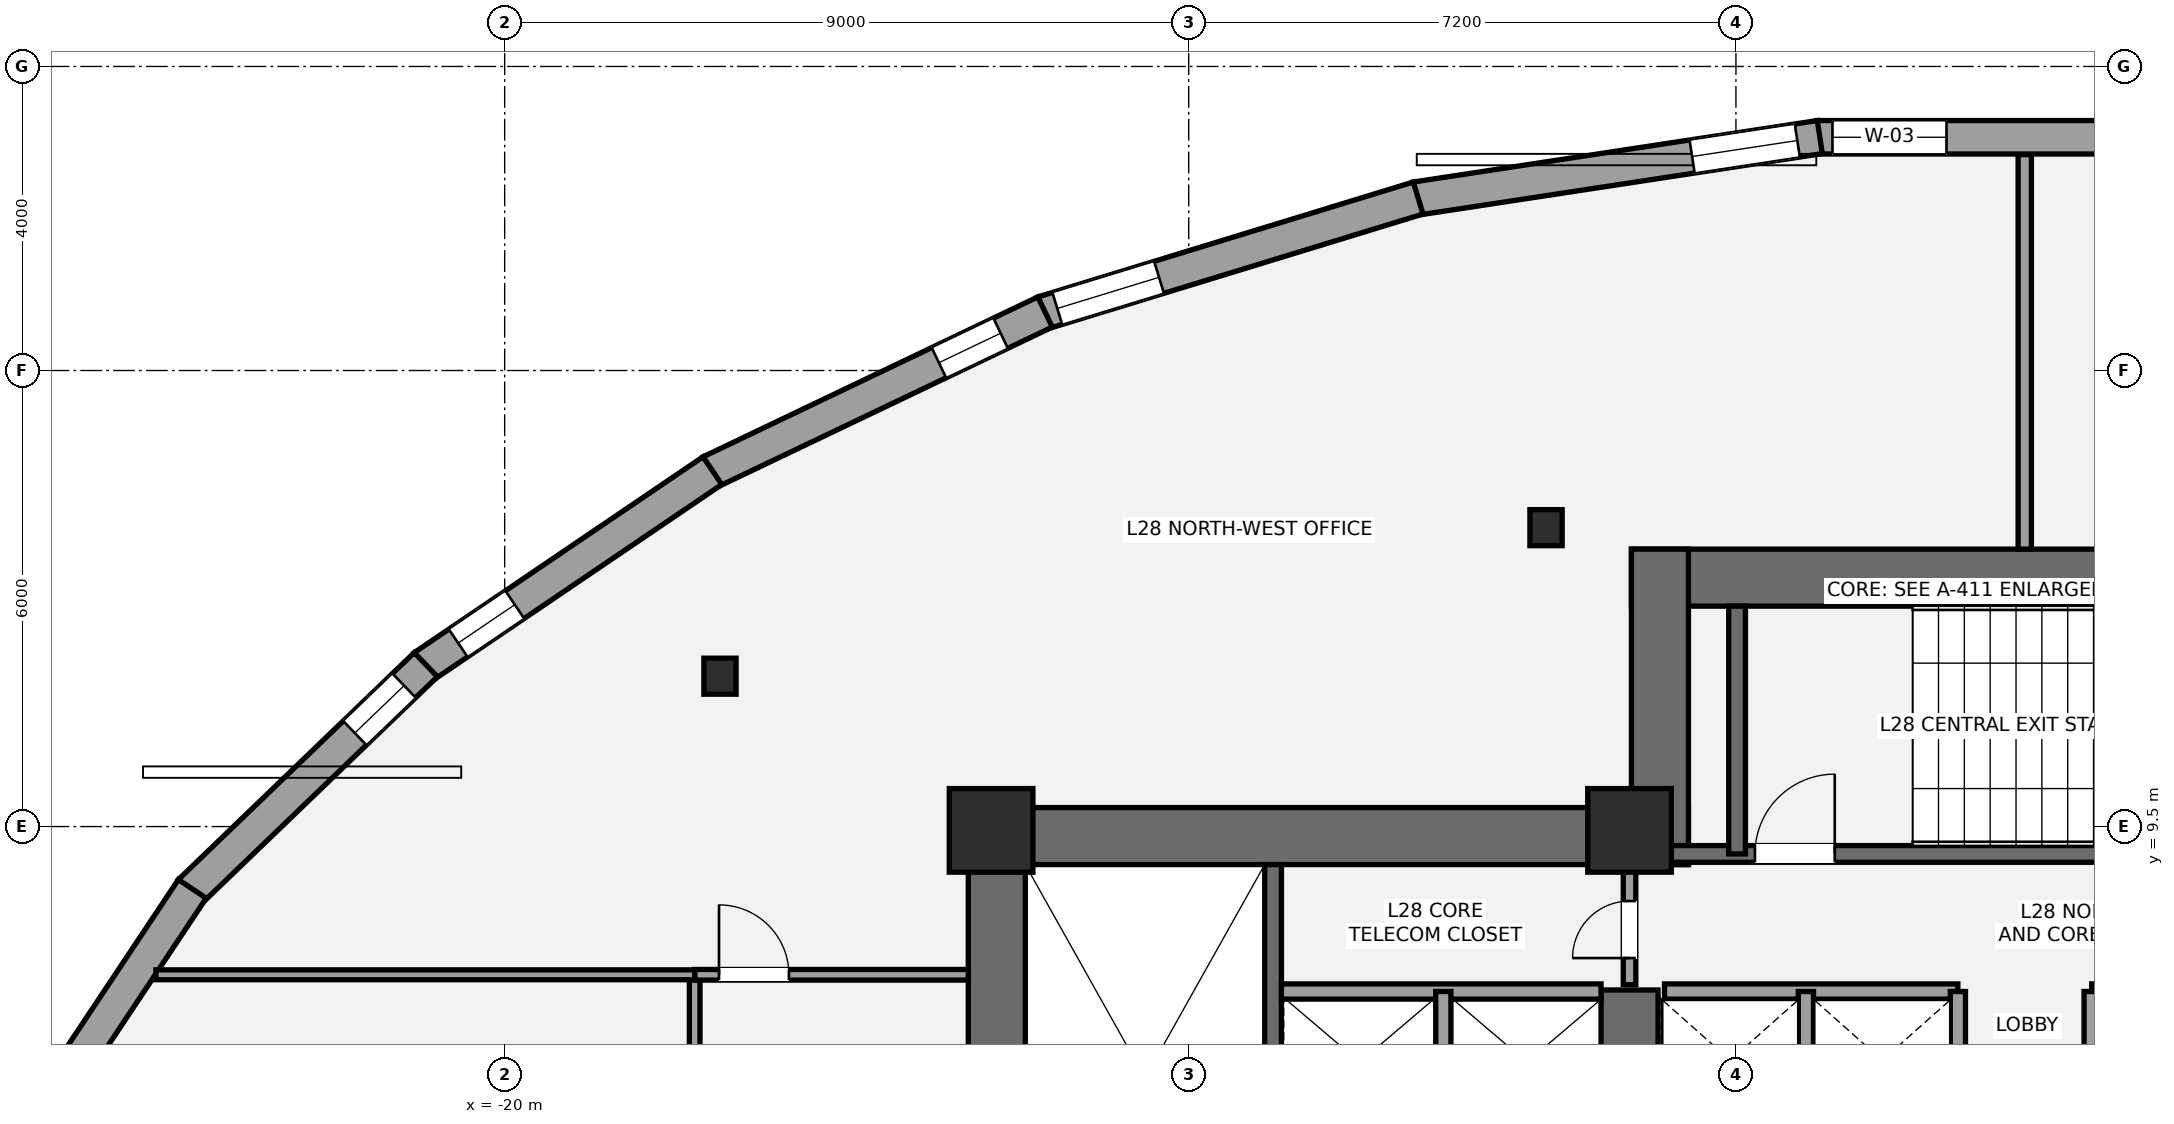
"""IFC4 building model, lengths in metres.
Left out: names, types, materials, properties, quantities, classifications, styles, units other than length and angle.
Written with IfcOpenShell. Run it as: python <this file> out.ifc"""

import sys

from ifc_helpers import new_model, si_unit, direction, frame, frame_2d, origin, origin_2d, place, context, subcontext, project, spatial, rectangle, i_section, extrude, element, fill, save


model = new_model("IFC4")
c1 = context("Model", 3, precision=1e-05, world=origin(), true_north=direction((0.0, 1.0)))
c2 = subcontext(c1, "Body", "Model", "MODEL_VIEW")
j1 = project(units=[si_unit("LENGTHUNIT", "METRE"), si_unit("PLANEANGLEUNIT", "RADIAN")], contexts=[c1])
p1 = place(None, origin())
s1 = spatial("IfcSite", under=j1, at=p1, CompositionType="ELEMENT")
p2 = place(p1, origin())
s2 = spatial("IfcBuilding", under=s1, at=p2, CompositionType="ELEMENT")
p3 = place(p2, frame((0.0, 0.0, 107.1)))
s3 = spatial("IfcBuildingStorey", under=s2, at=p3, CompositionType="ELEMENT", Elevation=107.1)
p4 = place(p3, frame((-13.525, 1.1, 0.0), z_axis=(0.0, 0.0, 1.0), x_axis=(0.0, 1.0, 0.0)))
e1 = element("IfcWall", 1, at=p4, inside=s3, PredefinedType="SHEAR", context=c2, shape_type="SweptSolid", body=[
    extrude(rectangle(XDim=8.65, YDim=0.75, at=frame_2d((4.325, 0.0))), origin(), (0.0, 0.0, 1.0), 3.5),
])
p5 = place(p3, frame((-13.9, 9.375, 0.0), z_axis=(0.0, 0.0, 1.0), x_axis=(1.0, 0.0, 0.0)))
e2 = element("IfcWall", 2, at=p5, inside=s3, PredefinedType="SHEAR", context=c2, shape_type="SweptSolid", body=[
    extrude(rectangle(XDim=9.475, YDim=0.75, at=frame_2d((4.737, 0.0))), origin(), (0.0, 0.0, 1.0), 3.5),
])
p6 = place(p3, frame((-5.2, 5.35, 0.0), z_axis=(0.0, 0.0, 1.0), x_axis=(0.0, 1.0, 0.0)))
e3 = element("IfcWall", 3, at=p6, inside=s3, PredefinedType="SHEAR", context=c2, shape_type="SweptSolid", body=[
    extrude(rectangle(XDim=2.0, YDim=0.75, at=frame_2d((1.0, 0.0))), origin(), (0.0, 0.0, 1.0), 3.5),
])
p7 = place(p3, frame((-9.89, 1.85, 0.0), z_axis=(0.0, 0.0, 1.0), x_axis=(0.0, 1.0, 0.0)))
e4 = element("IfcWall", 4, at=p7, inside=s3, PredefinedType="SHEAR", context=c2, shape_type="SweptSolid", body=[
    extrude(rectangle(XDim=7.15, YDim=0.22, at=frame_2d((3.575, 0.0))), origin(), (0.0, 0.0, 1.0), 3.5),
])
p8 = place(p3, frame((-5.175, 12.775, 0.0), z_axis=(0.0, 0.0, 1.0), x_axis=(1.0, 0.0, 0.0)))
e5 = element("IfcWall", 5, at=p8, inside=s3, PredefinedType="SHEAR", context=c2, shape_type="SweptSolid", body=[
    extrude(rectangle(XDim=10.35, YDim=0.75, at=frame_2d((5.175, 0.0))), origin(), (0.0, 0.0, 1.0), 3.5),
])
p9 = place(p3, frame((-4.8, 9.0, 0.0), z_axis=(0.0, 0.0, 1.0), x_axis=(0.0, 1.0, 0.0)))
e6 = element("IfcWall", 6, at=p9, inside=s3, PredefinedType="SHEAR", context=c2, shape_type="SweptSolid", body=[
    extrude(rectangle(XDim=4.15, YDim=0.75, at=frame_2d((2.075, 0.0))), origin(), (0.0, 0.0, 1.0), 3.5),
])
p10 = place(p3, frame((-4.7, 9.14, 0.0), z_axis=(0.0, 0.0, 1.0), x_axis=(1.0, 0.0, 0.0)))
e7 = element("IfcWall", 7, at=p10, inside=s3, PredefinedType="SHEAR", context=c2, shape_type="SweptSolid", body=[
    extrude(rectangle(XDim=9.3, YDim=0.22, at=frame_2d((4.65, 0.0))), origin(), (0.0, 0.0, 1.0), 3.5),
])
p11 = place(p10, frame((1.15, 0.0, 0.0)))
e8 = element("IfcOpeningElement", 8, at=p11, cuts=e7, PredefinedType="OPENING", context=c2, shape_type="SweptSolid", body=[
    extrude(rectangle(XDim=1.05, YDim=2.15, at=frame_2d((0.525, 1.075))), frame((0.0, 0.12, 0.0), z_axis=(0.0, -1.0, 0.0), x_axis=(1.0, 0.0, 0.0)), (0.0, 0.0, 1.0), 0.24),
])
p12 = place(p3, frame((-3.785, 9.14, 0.0), z_axis=(0.0, 0.0, 1.0), x_axis=(0.0, 1.0, 0.0)))
e9 = element("IfcWall", 9, at=p12, inside=s3, PredefinedType="SHEAR", context=c2, shape_type="SweptSolid", body=[
    extrude(rectangle(XDim=3.26, YDim=0.22, at=frame_2d((1.63, 0.0))), origin(), (0.0, 0.0, 1.0), 3.5),
])
for number, where, z_axis, x_axis in (
    (10, (-13.6, 9.45, 0.0), (0.0, 0.0, 1.0), (1.0, 0.0, 0.0)),
    (11, (-5.2, 9.45, 0.0), (0.0, 0.0, 1.0), (1.0, 0.0, 0.0)),
):
    element("IfcColumn", number, at=place(p3, frame(where, z_axis=z_axis, x_axis=x_axis)), inside=s3, PredefinedType="COLUMN", context=c2, shape_type="SweptSolid", body=[
        extrude(rectangle(XDim=1.1, YDim=1.1, at=origin_2d()), origin(), (0.0, 0.0, 1.0), 3.5),
    ])
for number, where, z_axis, x_axis in (
    (12, (-6.299, 13.433, 0.0), (0.0, 0.0, 1.0), (1.0, 0.0, 0.0)),
    (13, (-17.167, 11.478, 0.0), (0.0, 0.0, 1.0), (1.0, 0.0, 0.0)),
):
    element("IfcColumn", number, at=place(p3, frame(where, z_axis=z_axis, x_axis=x_axis)), inside=s3, PredefinedType="COLUMN", context=c2, shape_type="SweptSolid", body=[
        extrude(i_section(OverallWidth=0.424, OverallDepth=0.474, WebThickness=0.048, FlangeThickness=0.077, at=origin_2d()), origin(), (0.0, 0.0, 1.0), 3.5),
    ])
p13 = place(p3, frame((-2.73, 18.568, 0.0), z_axis=(0.0, 0.0, 1.0), x_axis=(1.0, 0.0, 0.0)))
e14 = element("IfcWall", 14, at=p13, inside=s3, PredefinedType="STANDARD", context=c2, shape_type="SweptSolid", body=[
    extrude(rectangle(XDim=5.459, YDim=0.44, at=frame_2d((2.73, 0.0))), origin(), (0.0, 0.0, 1.0), 2.528),
])
p14 = place(p13, frame((0.2, 0.0, 0.48)))
e15 = element("IfcOpeningElement", 15, at=p14, cuts=e14, PredefinedType="OPENING", context=c2, shape_type="SweptSolid", body=[
    extrude(rectangle(XDim=1.5, YDim=1.7, at=frame_2d((0.75, 0.85))), frame((0.0, 0.23, 0.0), z_axis=(0.0, -1.0, 0.0), x_axis=(1.0, 0.0, 0.0)), (0.0, 0.0, 1.0), 0.46),
])
p15 = place(p3, frame((-8.012, 17.762, 0.0), z_axis=(0.0, 0.0, 1.0), x_axis=(0.988627497469, 0.150385076545, 0.0)))
e16 = element("IfcWall", 16, at=p15, inside=s3, PredefinedType="STANDARD", context=c2, shape_type="SweptSolid", body=[
    extrude(rectangle(XDim=5.377, YDim=0.44, at=frame_2d((2.688, 0.0))), origin(), (0.0, 0.0, 1.0), 2.528),
])
p16 = place(p15, frame((3.677, 0.0, 0.58)))
e17 = element("IfcOpeningElement", 17, at=p16, cuts=e16, PredefinedType="OPENING", context=c2, shape_type="SweptSolid", body=[
    extrude(rectangle(XDim=1.4, YDim=1.55, at=frame_2d((0.7, 0.775))), frame((0.0, 0.23, 0.0), z_axis=(0.0, -1.0, 0.0), x_axis=(1.0, 0.0, 0.0)), (0.0, 0.0, 1.0), 0.46),
])
p17 = place(p3, frame((-12.92, 16.258, 0.0), z_axis=(0.0, 0.0, 1.0), x_axis=(0.956228569431, 0.292620783617, 0.0)))
e18 = element("IfcWall", 18, at=p17, inside=s3, PredefinedType="STANDARD", context=c2, shape_type="SweptSolid", body=[
    extrude(rectangle(XDim=5.165, YDim=0.44, at=frame_2d((2.583, 0.0))), origin(), (0.0, 0.0, 1.0), 2.528),
])
p18 = place(p17, frame((0.2, 0.0, 0.58)))
e19 = element("IfcOpeningElement", 19, at=p18, cuts=e18, PredefinedType="OPENING", context=c2, shape_type="SweptSolid", body=[
    extrude(rectangle(XDim=1.4, YDim=1.55, at=frame_2d((0.7, 0.775))), frame((0.0, 0.23, 0.0), z_axis=(0.0, -1.0, 0.0), x_axis=(1.0, 0.0, 0.0)), (0.0, 0.0, 1.0), 0.46),
])
p19 = place(p3, frame((-17.295, 14.166, 0.0), z_axis=(0.0, 0.0, 1.0), x_axis=(0.902372757907, 0.430956385018, 0.0)))
e20 = element("IfcWall", 20, at=p19, inside=s3, PredefinedType="STANDARD", context=c2, shape_type="SweptSolid", body=[
    extrude(rectangle(XDim=4.882, YDim=0.44, at=frame_2d((2.441, 0.0))), origin(), (0.0, 0.0, 1.0), 2.528),
])
p20 = place(p19, frame((3.334, 0.0, 0.58)))
e21 = element("IfcOpeningElement", 21, at=p20, cuts=e20, PredefinedType="OPENING", context=c2, shape_type="SweptSolid", body=[
    extrude(rectangle(XDim=0.9, YDim=1.35, at=frame_2d((0.45, 0.675))), frame((0.0, 0.23, 0.0), z_axis=(0.0, -1.0, 0.0), x_axis=(1.0, 0.0, 0.0)), (0.0, 0.0, 1.0), 0.46),
])
p21 = place(p3, frame((-21.066, 11.606, 0.0), z_axis=(0.0, 0.0, 1.0), x_axis=(0.827754551165, 0.56109036975, 0.0)))
e22 = element("IfcWall", 22, at=p21, inside=s3, PredefinedType="STANDARD", context=c2, shape_type="SweptSolid", body=[
    extrude(rectangle(XDim=4.591, YDim=0.44, at=frame_2d((2.295, 0.0))), origin(), (0.0, 0.0, 1.0), 2.528),
])
p22 = place(p21, frame((0.549, 0.0, 0.58)))
e23 = element("IfcOpeningElement", 23, at=p22, cuts=e22, PredefinedType="OPENING", context=c2, shape_type="SweptSolid", body=[
    extrude(rectangle(XDim=0.9, YDim=1.35, at=frame_2d((0.45, 0.675))), frame((0.0, 0.23, 0.0), z_axis=(0.0, -1.0, 0.0), x_axis=(1.0, 0.0, 0.0)), (0.0, 0.0, 1.0), 0.46),
])
p23 = place(p3, frame((-24.14, 8.644, 0.0), z_axis=(0.0, 0.0, 1.0), x_axis=(0.720581378362, 0.693370375166, 0.0)))
e24 = element("IfcWall", 24, at=p23, inside=s3, PredefinedType="STANDARD", context=c2, shape_type="SweptSolid", body=[
    extrude(rectangle(XDim=4.307, YDim=0.44, at=frame_2d((2.153, 0.0))), origin(), (0.0, 0.0, 1.0), 2.528),
])
p24 = place(p23, frame((3.01, 0.0, 0.58)))
e25 = element("IfcOpeningElement", 25, at=p24, cuts=e24, PredefinedType="OPENING", context=c2, shape_type="SweptSolid", body=[
    extrude(rectangle(XDim=0.9, YDim=1.35, at=frame_2d((0.45, 0.675))), frame((0.0, 0.23, 0.0), z_axis=(0.0, -1.0, 0.0), x_axis=(1.0, 0.0, 0.0)), (0.0, 0.0, 1.0), 0.46),
])
p25 = place(p3, frame((-26.34, 5.332, 0.0), z_axis=(0.0, 0.0, 1.0), x_axis=(0.554293965046, 0.83232097193, 0.0)))
e26 = element("IfcWall", 26, at=p25, inside=s3, PredefinedType="STANDARD", context=c2, shape_type="SweptSolid", body=[
    extrude(rectangle(XDim=4.023, YDim=0.44, at=frame_2d((2.011, 0.0))), origin(), (0.0, 0.0, 1.0), 2.528),
])
p26 = place(p25, frame((0.299, 0.0, 0.58)))
e27 = element("IfcOpeningElement", 27, at=p26, cuts=e26, PredefinedType="OPENING", context=c2, shape_type="SweptSolid", body=[
    extrude(rectangle(XDim=0.9, YDim=1.35, at=frame_2d((0.45, 0.675))), frame((0.0, 0.23, 0.0), z_axis=(0.0, -1.0, 0.0), x_axis=(1.0, 0.0, 0.0)), (0.0, 0.0, 1.0), 0.46),
])
p27 = place(p3, frame((-9.78, 7.33, 0.0), z_axis=(0.0, 0.0, 1.0), x_axis=(1.0, 0.0, 0.0)))
e28 = element("IfcWall", 28, at=p27, inside=s3, PredefinedType="SOLIDWALL", context=c2, shape_type="SweptSolid", body=[
    extrude(rectangle(XDim=4.205, YDim=0.2, at=frame_2d((2.103, 0.0))), origin(), (0.0, 0.0, 1.0), 3.31),
])
p28 = place(p3, frame((-7.65, 5.47, 0.0), z_axis=(0.0, 0.0, 1.0), x_axis=(0.0, 1.0, 0.0)))
e29 = element("IfcWall", 29, at=p28, inside=s3, PredefinedType="SOLIDWALL", context=c2, shape_type="SweptSolid", body=[
    extrude(rectangle(XDim=1.86, YDim=0.2, at=frame_2d((0.93, 0.0))), origin(), (0.0, 0.0, 1.0), 3.31),
])
for number, where, z_axis, x_axis in (
    (30, (-4.74, 7.33, 0.0), (0.0, 0.0, 1.0), (1.0, 0.0, 0.0)),
    (31, (0.88, 7.33, 0.0), (0.0, 0.0, 1.0), (1.0, 0.0, 0.0)),
):
    element("IfcWall", number, at=place(p3, frame(where, z_axis=z_axis, x_axis=x_axis)), inside=s3, PredefinedType="SOLIDWALL", context=c2, shape_type="SweptSolid", body=[
        extrude(rectangle(XDim=3.86, YDim=0.2, at=frame_2d((1.93, 0.0))), origin(), (0.0, 0.0, 1.0), 3.31),
    ])
for number, where, z_axis, x_axis in (
    (32, (-2.88, 5.52, 0.0), (0.0, 0.0, 1.0), (0.0, 1.0, 0.0)),
    (33, (-0.88, 5.52, 0.0), (0.0, 0.0, 1.0), (0.0, 1.0, 0.0)),
    (34, (0.88, 5.52, 0.0), (0.0, 0.0, 1.0), (0.0, 1.0, 0.0)),
):
    element("IfcWall", number, at=place(p3, frame(where, z_axis=z_axis, x_axis=x_axis)), inside=s3, PredefinedType="SOLIDWALL", context=c2, shape_type="SweptSolid", body=[
        extrude(rectangle(XDim=1.81, YDim=0.2, at=frame_2d((0.905, 0.0))), origin(), (0.0, 0.0, 1.0), 3.31),
    ])
p29 = place(p3, frame((-5.2, 7.42, 0.0), z_axis=(0.0, 0.0, 1.0), x_axis=(0.0, 1.0, 0.0)))
e35 = element("IfcWall", 35, at=p29, inside=s3, PredefinedType="PARTITIONING", context=c2, shape_type="SweptSolid", body=[
    extrude(rectangle(XDim=1.58, YDim=0.165, at=frame_2d((0.79, 0.0))), origin(), (0.0, 0.0, 1.0), 3.31),
])
p30 = place(p29, frame((0.35, 0.0, 0.0)))
e36 = element("IfcOpeningElement", 36, at=p30, cuts=e35, PredefinedType="OPENING", context=c2, shape_type="SweptSolid", body=[
    extrude(rectangle(XDim=0.75, YDim=2.1, at=frame_2d((0.375, 1.05))), frame((0.0, 0.093, 0.0), z_axis=(0.0, -1.0, 0.0), x_axis=(1.0, 0.0, 0.0)), (0.0, 0.0, 1.0), 0.185),
])
p31 = place(p3, frame((-17.5, -13.748, 0.0), z_axis=(0.0, 0.0, 1.0), x_axis=(0.0, 1.0, 0.0)))
e37 = element("IfcWall", 37, at=p31, inside=s3, PredefinedType="PARTITIONING", context=c2, shape_type="SweptSolid", body=[
    extrude(rectangle(XDim=21.298, YDim=0.14, at=frame_2d((10.649, 0.0))), origin(), (0.0, 0.0, 1.0), 2.688),
])
p32 = place(p31, frame((10.499, 0.0, 0.0)))
e38 = element("IfcOpeningElement", 38, at=p32, cuts=e37, PredefinedType="OPENING", context=c2, shape_type="SweptSolid", body=[
    extrude(rectangle(XDim=0.9, YDim=2.1, at=frame_2d((0.45, 1.05))), frame((0.0, 0.08, 0.0), z_axis=(0.0, -1.0, 0.0), x_axis=(1.0, 0.0, 0.0)), (0.0, 0.0, 1.0), 0.16),
])
p33 = place(p31, frame((17.974, 0.0, 0.0)))
e39 = element("IfcOpeningElement", 39, at=p33, cuts=e37, PredefinedType="OPENING", context=c2, shape_type="SweptSolid", body=[
    extrude(rectangle(XDim=0.9, YDim=2.1, at=frame_2d((0.45, 1.05))), frame((0.0, 0.08, 0.0), z_axis=(0.0, -1.0, 0.0), x_axis=(1.0, 0.0, 0.0)), (0.0, 0.0, 1.0), 0.16),
])
p34 = place(p3, frame((-17.5, 7.55, 0.0), z_axis=(0.0, 0.0, 1.0), x_axis=(1.0, 0.0, 0.0)))
e40 = element("IfcWall", 40, at=p34, inside=s3, PredefinedType="PARTITIONING", context=c2, shape_type="SweptSolid", body=[
    extrude(rectangle(XDim=3.6, YDim=0.14, at=frame_2d((1.8, 0.0))), origin(), (0.0, 0.0, 1.0), 3.31),
])
p35 = place(p34, frame((0.32, 0.0, 0.0)))
e41 = element("IfcOpeningElement", 41, at=p35, cuts=e40, PredefinedType="OPENING", context=c2, shape_type="SweptSolid", body=[
    extrude(rectangle(XDim=0.92, YDim=2.15, at=frame_2d((0.46, 1.075))), frame((0.0, 0.08, 0.0), z_axis=(0.0, -1.0, 0.0), x_axis=(1.0, 0.0, 0.0)), (0.0, 0.0, 1.0), 0.16),
])
p36 = place(p3, frame((0.0, 13.15, 0.0), z_axis=(0.0, 0.0, 1.0), x_axis=(0.0, 1.0, 0.0)))
e42 = element("IfcWall", 42, at=p36, inside=s3, PredefinedType="PARTITIONING", context=c2, shape_type="SweptSolid", body=[
    extrude(rectangle(XDim=5.19, YDim=0.175, at=frame_2d((2.595, 0.0))), origin(), (0.0, 0.0, 1.0), 3.31),
])
p37 = place(p3, frame((-24.589, 7.55, 0.0), z_axis=(0.0, 0.0, 1.0), x_axis=(1.0, 0.0, 0.0)))
e43 = element("IfcWall", 43, at=p37, inside=s3, PredefinedType="PARTITIONING", context=c2, shape_type="SweptSolid", body=[
    extrude(rectangle(XDim=7.089, YDim=0.13, at=frame_2d((3.544, 0.0))), origin(), (0.0, 0.0, 1.0), 2.763),
])
p38 = place(p14, origin())
e44 = element("IfcWindow", 44, at=p38, inside=s3, PartitioningType="SINGLE_PANEL", PredefinedType="WINDOW", context=c2, shape_type="SweptSolid", body=[
    extrude(rectangle(XDim=1.5, YDim=1.7, at=frame_2d((0.75, 0.85))), frame((0.0, -0.01, 0.0), z_axis=(0.0, -1.0, 0.0), x_axis=(1.0, 0.0, 0.0)), (0.0, 0.0, 1.0), 0.06),
])
fill(e15, e44)
p39 = place(p16, origin())
e45 = element("IfcWindow", 45, at=p39, inside=s3, PartitioningType="SINGLE_PANEL", PredefinedType="WINDOW", context=c2, shape_type="SweptSolid", body=[
    extrude(rectangle(XDim=1.4, YDim=1.55, at=frame_2d((0.7, 0.775))), frame((0.0, -0.01, 0.0), z_axis=(0.0, -1.0, 0.0), x_axis=(1.0, 0.0, 0.0)), (0.0, 0.0, 1.0), 0.06),
])
fill(e17, e45)
p40 = place(p18, origin())
e46 = element("IfcWindow", 46, at=p40, inside=s3, PartitioningType="SINGLE_PANEL", PredefinedType="WINDOW", context=c2, shape_type="SweptSolid", body=[
    extrude(rectangle(XDim=1.4, YDim=1.55, at=frame_2d((0.7, 0.775))), frame((0.0, -0.01, 0.0), z_axis=(0.0, -1.0, 0.0), x_axis=(1.0, 0.0, 0.0)), (0.0, 0.0, 1.0), 0.06),
])
fill(e19, e46)
p41 = place(p20, origin())
e47 = element("IfcWindow", 47, at=p41, inside=s3, PartitioningType="SINGLE_PANEL", PredefinedType="WINDOW", context=c2, shape_type="SweptSolid", body=[
    extrude(rectangle(XDim=0.9, YDim=1.35, at=frame_2d((0.45, 0.675))), frame((0.0, -0.01, 0.0), z_axis=(0.0, -1.0, 0.0), x_axis=(1.0, 0.0, 0.0)), (0.0, 0.0, 1.0), 0.06),
])
fill(e21, e47)
p42 = place(p22, origin())
e48 = element("IfcWindow", 48, at=p42, inside=s3, PartitioningType="SINGLE_PANEL", PredefinedType="WINDOW", context=c2, shape_type="SweptSolid", body=[
    extrude(rectangle(XDim=0.9, YDim=1.35, at=frame_2d((0.45, 0.675))), frame((0.0, -0.01, 0.0), z_axis=(0.0, -1.0, 0.0), x_axis=(1.0, 0.0, 0.0)), (0.0, 0.0, 1.0), 0.06),
])
fill(e23, e48)
p43 = place(p24, origin())
e49 = element("IfcWindow", 49, at=p43, inside=s3, PartitioningType="SINGLE_PANEL", PredefinedType="WINDOW", context=c2, shape_type="SweptSolid", body=[
    extrude(rectangle(XDim=0.9, YDim=1.35, at=frame_2d((0.45, 0.675))), frame((0.0, -0.01, 0.0), z_axis=(0.0, -1.0, 0.0), x_axis=(1.0, 0.0, 0.0)), (0.0, 0.0, 1.0), 0.06),
])
fill(e25, e49)
p44 = place(p11, origin())
e50 = element("IfcDoor", 50, at=p44, inside=s3, OperationType="SINGLE_SWING_RIGHT", PredefinedType="DOOR", context=c2, shape_type="SweptSolid", body=[
    extrude(rectangle(XDim=1.05, YDim=2.15, at=frame_2d((0.525, 1.075))), frame((0.0, 0.025, 0.0), z_axis=(0.0, -1.0, 0.0), x_axis=(1.0, 0.0, 0.0)), (0.0, 0.0, 1.0), 0.05),
])
fill(e8, e50)
p45 = place(p30, origin())
e51 = element("IfcDoor", 51, at=p45, inside=s3, OperationType="SINGLE_SWING_LEFT", PredefinedType="DOOR", context=c2, shape_type="SweptSolid", body=[
    extrude(rectangle(XDim=0.75, YDim=2.1, at=frame_2d((0.375, 1.05))), frame((0.0, 0.025, 0.0), z_axis=(0.0, -1.0, 0.0), x_axis=(1.0, 0.0, 0.0)), (0.0, 0.0, 1.0), 0.05),
])
fill(e36, e51)
p46 = place(p35, origin())
e52 = element("IfcDoor", 52, at=p46, inside=s3, OperationType="SINGLE_SWING_LEFT", PredefinedType="DOOR", context=c2, shape_type="SweptSolid", body=[
    extrude(rectangle(XDim=0.92, YDim=2.15, at=frame_2d((0.46, 1.075))), frame((0.0, 0.025, 0.0), z_axis=(0.0, -1.0, 0.0), x_axis=(1.0, 0.0, 0.0)), (0.0, 0.0, 1.0), 0.05),
])
fill(e41, e52)
save(model, sys.argv[1])
